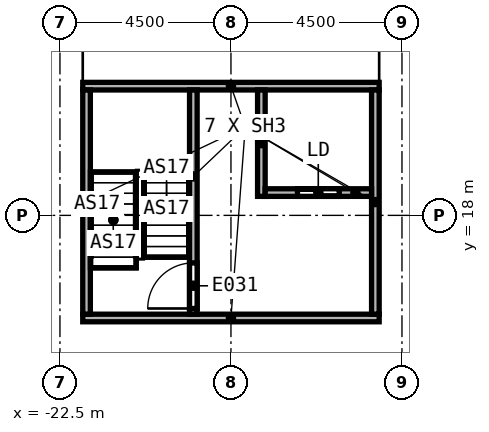
"""IFC4 building model, lengths in metres.
Left out: names, types, materials, properties, quantities, classifications, styles, units other than length and angle.
Written with IfcOpenShell. Run it as: python <this file> out.ifc"""

import sys

from ifc_helpers import new_model, si_unit, direction, frame, frame_2d, origin, place, context, subcontext, project, spatial, rectangle, extrude, element, fill, save


model = new_model("IFC4")
c1 = context("Model", 3, precision=1e-05, world=origin(), true_north=direction((0.0, 1.0)))
c2 = subcontext(c1, "Body", "Model", "MODEL_VIEW")
j1 = project(units=[si_unit("LENGTHUNIT", "METRE"), si_unit("PLANEANGLEUNIT", "RADIAN")], contexts=[c1])
p1 = place(None, origin())
s1 = spatial("IfcSite", under=j1, at=p1, CompositionType="ELEMENT")
p2 = place(p1, origin())
s2 = spatial("IfcBuilding", under=s1, at=p2, CompositionType="ELEMENT")
p3 = place(p2, frame((0.0, 0.0, 25.0)))
s3 = spatial("IfcBuildingStorey", under=s2, at=p3, CompositionType="ELEMENT", Elevation=25.0)
for number, where, z_axis, x_axis in (
    (1, (-21.9, 15.3, 0.0), (0.0, 0.0, 1.0), (1.0, 0.0, 0.0)),
    (2, (-21.9, 21.4, 0.0), (0.0, 0.0, 1.0), (1.0, 0.0, 0.0)),
):
    element("IfcWall", number, at=place(p3, frame(where, z_axis=z_axis, x_axis=x_axis)), inside=s3, PredefinedType="SOLIDWALL", context=c2, shape_type="SweptSolid", body=[
        extrude(rectangle(XDim=7.8, YDim=0.2, at=frame_2d((3.9, 0.0))), origin(), (0.0, 0.0, 1.0), 5.7),
    ])
for number, where, z_axis, x_axis in (
    (3, (-21.8, 15.4, 0.0), (0.0, 0.0, 1.0), (0.0, 1.0, 0.0)),
    (4, (-14.2, 15.4, 0.0), (0.0, 0.0, 1.0), (0.0, 1.0, 0.0)),
):
    element("IfcWall", number, at=place(p3, frame(where, z_axis=z_axis, x_axis=x_axis)), inside=s3, PredefinedType="SOLIDWALL", context=c2, shape_type="SweptSolid", body=[
        extrude(rectangle(XDim=5.9, YDim=0.2, at=frame_2d((2.95, 0.0))), origin(), (0.0, 0.0, 1.0), 5.7),
    ])
p4 = place(p3, frame((-18.99, 15.4, 0.0), z_axis=(0.0, 0.0, 1.0), x_axis=(0.0, 1.0, 0.0)))
e5 = element("IfcWall", 5, at=p4, inside=s3, PredefinedType="SOLIDWALL", context=c2, shape_type="SweptSolid", body=[
    extrude(rectangle(XDim=5.9, YDim=0.2, at=frame_2d((2.95, 0.0))), origin(), (0.0, 0.0, 1.0), 5.7),
])
p5 = place(p4, frame((0.15, 0.0, 0.0)))
e6 = element("IfcOpeningElement", 6, at=p5, cuts=e5, PredefinedType="OPENING", context=c2, shape_type="SweptSolid", body=[
    extrude(rectangle(XDim=1.2, YDim=2.1, at=frame_2d((0.6, 1.05))), frame((0.0, 0.1, 0.0), z_axis=(0.0, -1.0, 0.0), x_axis=(1.0, 0.0, 0.0)), (0.0, 0.0, 1.0), 0.2),
])
p6 = place(p3, frame((-17.2, 18.5, 0.0), z_axis=(0.0, 0.0, 1.0), x_axis=(0.0, 1.0, 0.0)))
e7 = element("IfcWall", 7, at=p6, inside=s3, PredefinedType="SOLIDWALL", context=c2, shape_type="SweptSolid", body=[
    extrude(rectangle(XDim=2.8, YDim=0.2, at=frame_2d((1.4, 0.0))), origin(), (0.0, 0.0, 1.0), 5.7),
])
p7 = place(p3, frame((-17.1, 18.6, 0.0), z_axis=(0.0, 0.0, 1.0), x_axis=(1.0, 0.0, 0.0)))
e8 = element("IfcWall", 8, at=p7, inside=s3, PredefinedType="SOLIDWALL", context=c2, shape_type="SweptSolid", body=[
    extrude(rectangle(XDim=2.8, YDim=0.2, at=frame_2d((1.4, 0.0))), origin(), (0.0, 0.0, 1.0), 5.7),
])
p8 = place(p7, frame((0.85, 0.0, 0.0)))
e9 = element("IfcOpeningElement", 9, at=p8, cuts=e8, PredefinedType="OPENING", context=c2, shape_type="SweptSolid", body=[
    extrude(rectangle(XDim=1.1, YDim=2.1, at=frame_2d((0.55, 1.05))), frame((0.0, 0.1, 0.0), z_axis=(0.0, -1.0, 0.0), x_axis=(1.0, 0.0, 0.0)), (0.0, 0.0, 1.0), 0.2),
])
p9 = place(p5, origin())
e10 = element("IfcDoor", 10, at=p9, inside=s3, OperationType="SINGLE_SWING_LEFT", PredefinedType="DOOR", context=c2, shape_type="SweptSolid", body=[
    extrude(rectangle(XDim=1.2, YDim=2.1, at=frame_2d((0.6, 1.05))), frame((0.0, 0.025, 0.0), z_axis=(0.0, -1.0, 0.0), x_axis=(1.0, 0.0, 0.0)), (0.0, 0.0, 1.0), 0.05),
])
fill(e6, e10)
p10 = place(p8, origin())
e11 = element("IfcDoor", 11, at=p10, inside=s3, OperationType="SLIDING_TO_LEFT", PredefinedType="DOOR", context=c2, shape_type="SweptSolid", body=[
    extrude(rectangle(XDim=1.1, YDim=2.1, at=frame_2d((0.55, 1.05))), frame((0.0, 0.025, 0.0), z_axis=(0.0, -1.0, 0.0), x_axis=(1.0, 0.0, 0.0)), (0.0, 0.0, 1.0), 0.05),
])
fill(e9, e11)
save(model, sys.argv[1])
